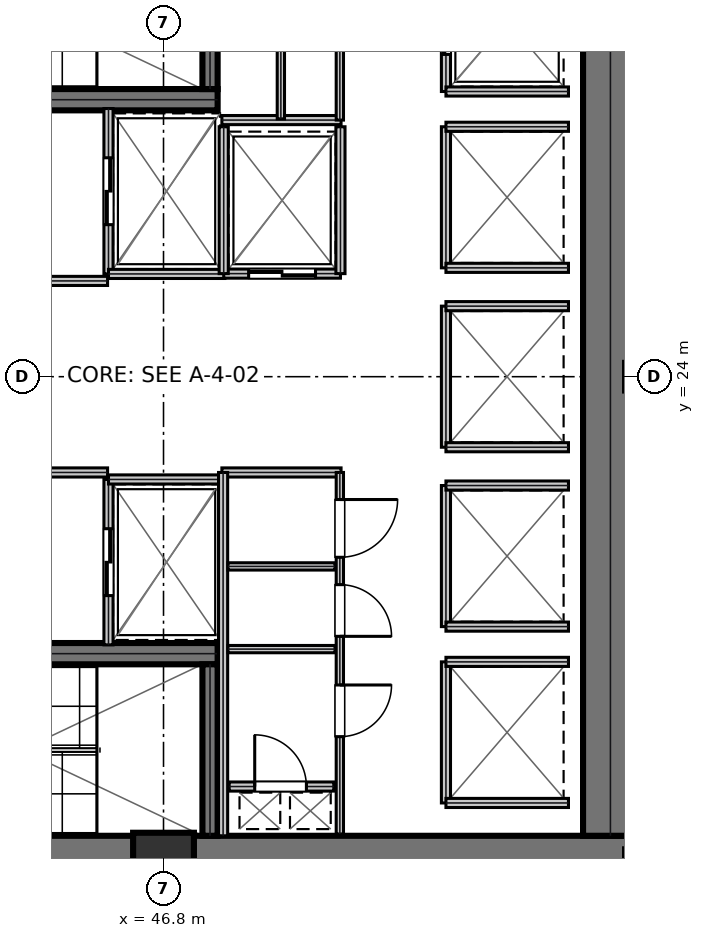
"""IFC4 building model, lengths in metres.
Left out: names, types, materials, properties, quantities, classifications, styles, units other than length and angle.
Written with IfcOpenShell. Run it as: python <this file> out.ifc"""

import sys

from ifc_helpers import new_model, si_unit, direction, frame, frame_2d, origin, origin_2d, place, context, subcontext, project, spatial, rectangle, extrude, element, fill, save


model = new_model("IFC4")
c1 = context("Model", 3, precision=1e-05, world=origin(), true_north=direction((0.0, 1.0)))
c2 = subcontext(c1, "Body", "Model", "MODEL_VIEW")
j1 = project(units=[si_unit("LENGTHUNIT", "METRE"), si_unit("PLANEANGLEUNIT", "RADIAN")], contexts=[c1])
p1 = place(None, origin())
s1 = spatial("IfcSite", under=j1, at=p1, CompositionType="ELEMENT")
p2 = place(p1, origin())
s2 = spatial("IfcBuilding", under=s1, at=p2, CompositionType="ELEMENT")
p3 = place(p2, frame((0.0, 0.0, 10.8)))
s3 = spatial("IfcBuildingStorey", under=s2, at=p3, CompositionType="ELEMENT", Elevation=10.8)
p4 = place(p3, frame((38.8, 16.0, 0.0), z_axis=(0.0, 0.0, 1.0), x_axis=(1.0, 0.0, 0.0)))
e1 = element("IfcWall", 1, at=p4, inside=s3, PredefinedType="SHEAR", context=c2, shape_type="SweptSolid", body=[
    extrude(rectangle(XDim=16.0, YDim=0.9, at=frame_2d((8.0, 0.0))), origin(), (0.0, 0.0, 1.0), 5.12),
])
p5 = place(p3, frame((54.15, 16.45, 0.0), z_axis=(0.0, 0.0, 1.0), x_axis=(0.0, 1.0, 0.0)))
e2 = element("IfcWall", 2, at=p5, inside=s3, PredefinedType="SHEAR", context=c2, shape_type="SweptSolid", body=[
    extrude(rectangle(XDim=15.1, YDim=0.9, at=frame_2d((7.55, 0.0))), origin(), (0.0, 0.0, 1.0), 5.12),
])
p6 = place(p3, frame((39.98, 28.555, 0.0), z_axis=(0.0, 0.0, 1.0), x_axis=(1.0, 0.0, 0.0)))
e3 = element("IfcWall", 3, at=p6, inside=s3, PredefinedType="SHEAR", context=c2, shape_type="SweptSolid", body=[
    extrude(rectangle(XDim=7.71, YDim=0.35, at=frame_2d((3.855, 0.0))), origin(), (0.0, 0.0, 1.0), 5.12),
])
p7 = place(p6, frame((0.25, 0.0, 0.0)))
e4 = element("IfcOpeningElement", 4, at=p7, cuts=e3, PredefinedType="OPENING", context=c2, shape_type="SweptSolid", body=[
    extrude(rectangle(XDim=1.1, YDim=2.15, at=frame_2d((0.55, 1.075))), frame((0.0, 0.185, 0.0), z_axis=(0.0, -1.0, 0.0), x_axis=(1.0, 0.0, 0.0)), (0.0, 0.0, 1.0), 0.37),
])
p8 = place(p3, frame((39.98, 19.445, 0.0), z_axis=(0.0, 0.0, 1.0), x_axis=(1.0, 0.0, 0.0)))
e5 = element("IfcWall", 5, at=p8, inside=s3, PredefinedType="SHEAR", context=c2, shape_type="SweptSolid", body=[
    extrude(rectangle(XDim=7.71, YDim=0.35, at=frame_2d((3.855, 0.0))), origin(), (0.0, 0.0, 1.0), 5.12),
])
p9 = place(p8, frame((0.25, 0.0, 0.0)))
e6 = element("IfcOpeningElement", 6, at=p9, cuts=e5, PredefinedType="OPENING", context=c2, shape_type="SweptSolid", body=[
    extrude(rectangle(XDim=1.1, YDim=2.15, at=frame_2d((0.55, 1.075))), frame((0.0, 0.185, 0.0), z_axis=(0.0, -1.0, 0.0), x_axis=(1.0, 0.0, 0.0)), (0.0, 0.0, 1.0), 0.37),
])
for number, where, z_axis, x_axis in (
    (7, (47.565, 28.73, 0.0), (0.0, 0.0, 1.0), (0.0, 1.0, 0.0)),
    (8, (47.565, 16.45, 0.0), (0.0, 0.0, 1.0), (0.0, 1.0, 0.0)),
):
    element("IfcWall", number, at=place(p3, frame(where, z_axis=z_axis, x_axis=x_axis)), inside=s3, PredefinedType="SHEAR", context=c2, shape_type="SweptSolid", body=[
        extrude(rectangle(XDim=2.82, YDim=0.25, at=frame_2d((1.41, 0.0))), origin(), (0.0, 0.0, 1.0), 5.12),
    ])
p10 = place(p3, frame((46.8, 16.0, 0.0), z_axis=(0.0, 0.0, 1.0), x_axis=(1.0, 0.0, 0.0)))
e9 = element("IfcColumn", 9, at=p10, inside=s3, PredefinedType="COLUMN", context=c2, shape_type="SweptSolid", body=[
    extrude(rectangle(XDim=1.0, YDim=1.0, at=origin_2d()), origin(), (0.0, 0.0, 1.0), 5.395),
])
p11 = place(p3, frame((39.98, 25.575, 0.0), z_axis=(0.0, 0.0, 1.0), x_axis=(1.0, 0.0, 0.0)))
e10 = element("IfcWall", 10, at=p11, inside=s3, PredefinedType="PARTITIONING", context=c2, shape_type="SweptSolid", body=[
    extrude(rectangle(XDim=5.9, YDim=0.15, at=frame_2d((2.95, 0.0))), origin(), (0.0, 0.0, 1.0), 5.12),
])
p12 = place(p11, frame((2.35, 0.0, 0.0)))
e11 = element("IfcOpeningElement", 11, at=p12, cuts=e10, PredefinedType="OPENING", context=c2, shape_type="SweptSolid", body=[
    extrude(rectangle(XDim=1.05, YDim=2.15, at=frame_2d((0.525, 1.075))), frame((0.0, 0.085, 0.0), z_axis=(0.0, -1.0, 0.0), x_axis=(1.0, 0.0, 0.0)), (0.0, 0.0, 1.0), 0.17),
])
p13 = place(p3, frame((39.98, 22.425, 0.0), z_axis=(0.0, 0.0, 1.0), x_axis=(1.0, 0.0, 0.0)))
e12 = element("IfcWall", 12, at=p13, inside=s3, PredefinedType="PARTITIONING", context=c2, shape_type="SweptSolid", body=[
    extrude(rectangle(XDim=5.9, YDim=0.15, at=frame_2d((2.95, 0.0))), origin(), (0.0, 0.0, 1.0), 5.12),
])
p14 = place(p13, frame((2.35, 0.0, 0.0)))
e13 = element("IfcOpeningElement", 13, at=p14, cuts=e12, PredefinedType="OPENING", context=c2, shape_type="SweptSolid", body=[
    extrude(rectangle(XDim=1.05, YDim=2.15, at=frame_2d((0.525, 1.075))), frame((0.0, 0.085, 0.0), z_axis=(0.0, -1.0, 0.0), x_axis=(1.0, 0.0, 0.0)), (0.0, 0.0, 1.0), 0.17),
])
p15 = place(p3, frame((45.895, 25.69, 0.0), z_axis=(0.0, 0.0, 1.0), x_axis=(0.0, 1.0, 0.0)))
e14 = element("IfcWall", 14, at=p15, inside=s3, PredefinedType="PARTITIONING", context=c2, shape_type="SweptSolid", body=[
    extrude(rectangle(XDim=2.72, YDim=0.15, at=frame_2d((1.36, 0.0))), origin(), (0.0, 0.0, 1.0), 5.12),
])
p16 = place(p15, frame((0.81, 0.0, 0.0)))
e15 = element("IfcOpeningElement", 15, at=p16, cuts=e14, PredefinedType="OPENING", context=c2, shape_type="SweptSolid", body=[
    extrude(rectangle(XDim=1.1, YDim=2.15, at=frame_2d((0.55, 1.075))), frame((0.0, 0.085, 0.0), z_axis=(0.0, -1.0, 0.0), x_axis=(1.0, 0.0, 0.0)), (0.0, 0.0, 1.0), 0.17),
])
p17 = place(p3, frame((45.895, 25.69, 0.0), z_axis=(0.0, 0.0, 1.0), x_axis=(1.0, 0.0, 0.0)))
e16 = element("IfcWall", 16, at=p17, inside=s3, PredefinedType="PARTITIONING", context=c2, shape_type="SweptSolid", body=[
    extrude(rectangle(XDim=1.915, YDim=0.15, at=frame_2d((0.958, 0.0))), origin(), (0.0, 0.0, 1.0), 5.12),
])
p18 = place(p3, frame((45.895, 19.59, 0.0), z_axis=(0.0, 0.0, 1.0), x_axis=(0.0, 1.0, 0.0)))
e17 = element("IfcWall", 17, at=p18, inside=s3, PredefinedType="PARTITIONING", context=c2, shape_type="SweptSolid", body=[
    extrude(rectangle(XDim=2.72, YDim=0.15, at=frame_2d((1.36, 0.0))), origin(), (0.0, 0.0, 1.0), 5.12),
])
p19 = place(p18, frame((0.81, 0.0, 0.0)))
e18 = element("IfcOpeningElement", 18, at=p19, cuts=e17, PredefinedType="OPENING", context=c2, shape_type="SweptSolid", body=[
    extrude(rectangle(XDim=1.1, YDim=2.15, at=frame_2d((0.55, 1.075))), frame((0.0, 0.085, 0.0), z_axis=(0.0, -1.0, 0.0), x_axis=(1.0, 0.0, 0.0)), (0.0, 0.0, 1.0), 0.17),
])
p20 = place(p3, frame((45.895, 22.31, 0.0), z_axis=(0.0, 0.0, 1.0), x_axis=(1.0, 0.0, 0.0)))
e19 = element("IfcWall", 19, at=p20, inside=s3, PredefinedType="PARTITIONING", context=c2, shape_type="SweptSolid", body=[
    extrude(rectangle(XDim=1.915, YDim=0.15, at=frame_2d((0.958, 0.0))), origin(), (0.0, 0.0, 1.0), 5.12),
])
p21 = place(p3, frame((47.79, 25.695, 0.0), z_axis=(0.0, 0.0, 1.0), x_axis=(1.0, 0.0, 0.0)))
e20 = element("IfcWall", 20, at=p21, inside=s3, PredefinedType="PARTITIONING", context=c2, shape_type="SweptSolid", body=[
    extrude(rectangle(XDim=1.92, YDim=0.15, at=frame_2d((0.96, 0.0))), origin(), (0.0, 0.0, 1.0), 5.12),
])
p22 = place(p21, frame((0.41, 0.0, 0.0)))
e21 = element("IfcOpeningElement", 21, at=p22, cuts=e20, PredefinedType="OPENING", context=c2, shape_type="SweptSolid", body=[
    extrude(rectangle(XDim=1.1, YDim=2.15, at=frame_2d((0.55, 1.075))), frame((0.0, 0.085, 0.0), z_axis=(0.0, -1.0, 0.0), x_axis=(1.0, 0.0, 0.0)), (0.0, 0.0, 1.0), 0.17),
])
for number, where, z_axis, x_axis in (
    (22, (47.79, 25.695, 0.0), (0.0, 0.0, 1.0), (0.0, 1.0, 0.0)),
    (23, (49.71, 25.695, 0.0), (0.0, 0.0, 1.0), (0.0, 1.0, 0.0)),
):
    element("IfcWall", number, at=place(p3, frame(where, z_axis=z_axis, x_axis=x_axis)), inside=s3, PredefinedType="PARTITIONING", context=c2, shape_type="SweptSolid", body=[
        extrude(rectangle(XDim=2.415, YDim=0.15, at=frame_2d((1.208, 0.0))), origin(), (0.0, 0.0, 1.0), 5.12),
    ])
p23 = place(p3, frame((51.445, 28.69, 0.0), z_axis=(0.0, 0.0, 1.0), x_axis=(0.0, 1.0, 0.0)))
e24 = element("IfcWall", 24, at=p23, inside=s3, PredefinedType="PARTITIONING", context=c2, shape_type="SweptSolid", body=[
    extrude(rectangle(XDim=2.32, YDim=0.15, at=frame_2d((1.16, 0.0))), origin(), (0.0, 0.0, 1.0), 5.12),
])
p24 = place(p23, frame((0.61, 0.0, 0.0)))
e25 = element("IfcOpeningElement", 25, at=p24, cuts=e24, PredefinedType="OPENING", context=c2, shape_type="SweptSolid", body=[
    extrude(rectangle(XDim=1.1, YDim=2.15, at=frame_2d((0.55, 1.075))), frame((0.0, 0.085, 0.0), z_axis=(0.0, -1.0, 0.0), x_axis=(1.0, 0.0, 0.0)), (0.0, 0.0, 1.0), 0.17),
])
p25 = place(p3, frame((51.445, 28.69, 0.0), z_axis=(0.0, 0.0, 1.0), x_axis=(1.0, 0.0, 0.0)))
e26 = element("IfcWall", 26, at=p25, inside=s3, PredefinedType="PARTITIONING", context=c2, shape_type="SweptSolid", body=[
    extrude(rectangle(XDim=2.015, YDim=0.15, at=frame_2d((1.007, 0.0))), origin(), (0.0, 0.0, 1.0), 5.12),
])
p26 = place(p3, frame((51.445, 25.79, 0.0), z_axis=(0.0, 0.0, 1.0), x_axis=(0.0, 1.0, 0.0)))
e27 = element("IfcWall", 27, at=p26, inside=s3, PredefinedType="PARTITIONING", context=c2, shape_type="SweptSolid", body=[
    extrude(rectangle(XDim=2.32, YDim=0.15, at=frame_2d((1.16, 0.0))), origin(), (0.0, 0.0, 1.0), 5.12),
])
for number, where, z_axis, x_axis in (
    (28, (51.445, 25.79, 0.0), (0.0, 0.0, 1.0), (1.0, 0.0, 0.0)),
    (29, (51.445, 28.11, 0.0), (0.0, 0.0, 1.0), (1.0, 0.0, 0.0)),
):
    element("IfcWall", number, at=place(p3, frame(where, z_axis=z_axis, x_axis=x_axis)), inside=s3, PredefinedType="PARTITIONING", context=c2, shape_type="SweptSolid", body=[
        extrude(rectangle(XDim=2.015, YDim=0.15, at=frame_2d((1.007, 0.0))), origin(), (0.0, 0.0, 1.0), 5.12),
    ])
p27 = place(p3, frame((51.445, 19.89, 0.0), z_axis=(0.0, 0.0, 1.0), x_axis=(0.0, 1.0, 0.0)))
e30 = element("IfcWall", 30, at=p27, inside=s3, PredefinedType="PARTITIONING", context=c2, shape_type="SweptSolid", body=[
    extrude(rectangle(XDim=2.32, YDim=0.15, at=frame_2d((1.16, 0.0))), origin(), (0.0, 0.0, 1.0), 5.12),
])
for number, where, z_axis, x_axis in (
    (31, (51.445, 19.89, 0.0), (0.0, 0.0, 1.0), (1.0, 0.0, 0.0)),
    (32, (51.445, 22.21, 0.0), (0.0, 0.0, 1.0), (1.0, 0.0, 0.0)),
):
    element("IfcWall", number, at=place(p3, frame(where, z_axis=z_axis, x_axis=x_axis)), inside=s3, PredefinedType="PARTITIONING", context=c2, shape_type="SweptSolid", body=[
        extrude(rectangle(XDim=2.015, YDim=0.15, at=frame_2d((1.007, 0.0))), origin(), (0.0, 0.0, 1.0), 5.12),
    ])
p28 = place(p3, frame((51.445, 22.84, 0.0), z_axis=(0.0, 0.0, 1.0), x_axis=(0.0, 1.0, 0.0)))
e33 = element("IfcWall", 33, at=p28, inside=s3, PredefinedType="PARTITIONING", context=c2, shape_type="SweptSolid", body=[
    extrude(rectangle(XDim=2.32, YDim=0.15, at=frame_2d((1.16, 0.0))), origin(), (0.0, 0.0, 1.0), 5.12),
])
for number, where, z_axis, x_axis in (
    (34, (51.445, 22.84, 0.0), (0.0, 0.0, 1.0), (1.0, 0.0, 0.0)),
    (35, (51.445, 25.16, 0.0), (0.0, 0.0, 1.0), (1.0, 0.0, 0.0)),
):
    element("IfcWall", number, at=place(p3, frame(where, z_axis=z_axis, x_axis=x_axis)), inside=s3, PredefinedType="PARTITIONING", context=c2, shape_type="SweptSolid", body=[
        extrude(rectangle(XDim=2.015, YDim=0.15, at=frame_2d((1.007, 0.0))), origin(), (0.0, 0.0, 1.0), 5.12),
    ])
p29 = place(p3, frame((51.445, 16.99, 0.0), z_axis=(0.0, 0.0, 1.0), x_axis=(0.0, 1.0, 0.0)))
e36 = element("IfcWall", 36, at=p29, inside=s3, PredefinedType="PARTITIONING", context=c2, shape_type="SweptSolid", body=[
    extrude(rectangle(XDim=2.32, YDim=0.15, at=frame_2d((1.16, 0.0))), origin(), (0.0, 0.0, 1.0), 5.12),
])
for number, where, z_axis, x_axis in (
    (37, (51.445, 16.99, 0.0), (0.0, 0.0, 1.0), (1.0, 0.0, 0.0)),
    (38, (51.445, 19.31, 0.0), (0.0, 0.0, 1.0), (1.0, 0.0, 0.0)),
):
    element("IfcWall", number, at=place(p3, frame(where, z_axis=z_axis, x_axis=x_axis)), inside=s3, PredefinedType="PARTITIONING", context=c2, shape_type="SweptSolid", body=[
        extrude(rectangle(XDim=2.015, YDim=0.15, at=frame_2d((1.007, 0.0))), origin(), (0.0, 0.0, 1.0), 5.12),
    ])
p30 = place(p3, frame((47.88, 17.26, 0.0), z_axis=(0.0, 0.0, 1.0), x_axis=(1.0, 0.0, 0.0)))
e39 = element("IfcWall", 39, at=p30, inside=s3, PredefinedType="PARTITIONING", context=c2, shape_type="SweptSolid", body=[
    extrude(rectangle(XDim=1.72, YDim=0.15, at=frame_2d((0.86, 0.0))), origin(), (0.0, 0.0, 1.0), 5.12),
])
p31 = place(p30, frame((0.42, 0.0, 0.0)))
e40 = element("IfcOpeningElement", 40, at=p31, cuts=e39, PredefinedType="OPENING", context=c2, shape_type="SweptSolid", body=[
    extrude(rectangle(XDim=0.85, YDim=2.15, at=frame_2d((0.425, 1.075))), frame((0.0, 0.085, 0.0), z_axis=(0.0, -1.0, 0.0), x_axis=(1.0, 0.0, 0.0)), (0.0, 0.0, 1.0), 0.17),
])
p32 = place(p3, frame((47.76, 22.425, 0.0), z_axis=(0.0, 0.0, 1.0), x_axis=(1.0, 0.0, 0.0)))
e41 = element("IfcWall", 41, at=p32, inside=s3, PredefinedType="PARTITIONING", context=c2, shape_type="SweptSolid", body=[
    extrude(rectangle(XDim=1.96, YDim=0.15, at=frame_2d((0.98, 0.0))), origin(), (0.0, 0.0, 1.0), 5.12),
])
p33 = place(p3, frame((47.78, 16.45, 0.0), z_axis=(0.0, 0.0, 1.0), x_axis=(0.0, 1.0, 0.0)))
e42 = element("IfcWall", 42, at=p33, inside=s3, PredefinedType="PARTITIONING", context=c2, shape_type="SweptSolid", body=[
    extrude(rectangle(XDim=5.975, YDim=0.15, at=frame_2d((2.988, 0.0))), origin(), (0.0, 0.0, 1.0), 5.12),
])
for number, where, z_axis, x_axis in (
    (43, (47.86, 19.52, 0.0), (0.0, 0.0, 1.0), (1.0, 0.0, 0.0)),
    (44, (47.86, 20.88, 0.0), (0.0, 0.0, 1.0), (1.0, 0.0, 0.0)),
):
    element("IfcWall", number, at=place(p3, frame(where, z_axis=z_axis, x_axis=x_axis)), inside=s3, PredefinedType="PARTITIONING", context=c2, shape_type="SweptSolid", body=[
        extrude(rectangle(XDim=1.76, YDim=0.12, at=frame_2d((0.88, 0.0))), origin(), (0.0, 0.0, 1.0), 5.12),
    ])
p34 = place(p3, frame((49.7, 16.48, 0.0), z_axis=(0.0, 0.0, 1.0), x_axis=(0.0, 1.0, 0.0)))
e45 = element("IfcWall", 45, at=p34, inside=s3, PredefinedType="PARTITIONING", context=c2, shape_type="SweptSolid", body=[
    extrude(rectangle(XDim=5.945, YDim=0.12, at=frame_2d((2.973, 0.0))), origin(), (0.0, 0.0, 1.0), 5.12),
])
p35 = place(p34, frame((1.6, 0.0, 0.0)))
e46 = element("IfcOpeningElement", 46, at=p35, cuts=e45, PredefinedType="OPENING", context=c2, shape_type="SweptSolid", body=[
    extrude(rectangle(XDim=0.85, YDim=2.15, at=frame_2d((0.425, 1.075))), frame((0.0, 0.07, 0.0), z_axis=(0.0, -1.0, 0.0), x_axis=(1.0, 0.0, 0.0)), (0.0, 0.0, 1.0), 0.14),
])
p36 = place(p34, frame((3.25, 0.0, 0.0)))
e47 = element("IfcOpeningElement", 47, at=p36, cuts=e45, PredefinedType="OPENING", context=c2, shape_type="SweptSolid", body=[
    extrude(rectangle(XDim=0.85, YDim=2.15, at=frame_2d((0.425, 1.075))), frame((0.0, 0.07, 0.0), z_axis=(0.0, -1.0, 0.0), x_axis=(1.0, 0.0, 0.0)), (0.0, 0.0, 1.0), 0.14),
])
p37 = place(p34, frame((4.55, 0.0, 0.0)))
e48 = element("IfcOpeningElement", 48, at=p37, cuts=e45, PredefinedType="OPENING", context=c2, shape_type="SweptSolid", body=[
    extrude(rectangle(XDim=0.95, YDim=2.15, at=frame_2d((0.475, 1.075))), frame((0.0, 0.07, 0.0), z_axis=(0.0, -1.0, 0.0), x_axis=(1.0, 0.0, 0.0)), (0.0, 0.0, 1.0), 0.14),
])
p38 = place(p3, frame((47.76, 28.22, 0.0), z_axis=(0.0, 0.0, 1.0), x_axis=(1.0, 0.0, 0.0)))
e49 = element("IfcWall", 49, at=p38, inside=s3, PredefinedType="PARTITIONING", context=c2, shape_type="SweptSolid", body=[
    extrude(rectangle(XDim=1.96, YDim=0.15, at=frame_2d((0.98, 0.0))), origin(), (0.0, 0.0, 1.0), 5.12),
])
p39 = place(p3, frame((48.73, 28.24, 0.0), z_axis=(0.0, 0.0, 1.0), x_axis=(0.0, 1.0, 0.0)))
e50 = element("IfcWall", 50, at=p39, inside=s3, PredefinedType="PARTITIONING", context=c2, shape_type="SweptSolid", body=[
    extrude(rectangle(XDim=3.28, YDim=0.12, at=frame_2d((1.64, 0.0))), origin(), (0.0, 0.0, 1.0), 5.12),
])
p40 = place(p39, frame((1.15, 0.0, 0.0)))
e51 = element("IfcOpeningElement", 51, at=p40, cuts=e50, PredefinedType="OPENING", context=c2, shape_type="SweptSolid", body=[
    extrude(rectangle(XDim=0.85, YDim=2.15, at=frame_2d((0.425, 1.075))), frame((0.0, 0.07, 0.0), z_axis=(0.0, -1.0, 0.0), x_axis=(1.0, 0.0, 0.0)), (0.0, 0.0, 1.0), 0.14),
])
p41 = place(p3, frame((49.7, 28.22, 0.0), z_axis=(0.0, 0.0, 1.0), x_axis=(0.0, 1.0, 0.0)))
e52 = element("IfcWall", 52, at=p41, inside=s3, PredefinedType="PARTITIONING", context=c2, shape_type="SweptSolid", body=[
    extrude(rectangle(XDim=3.3, YDim=0.12, at=frame_2d((1.65, 0.0))), origin(), (0.0, 0.0, 1.0), 5.12),
])
p42 = place(p41, frame((1.15, 0.0, 0.0)))
e53 = element("IfcOpeningElement", 53, at=p42, cuts=e52, PredefinedType="OPENING", context=c2, shape_type="SweptSolid", body=[
    extrude(rectangle(XDim=0.85, YDim=2.15, at=frame_2d((0.425, 1.075))), frame((0.0, 0.07, 0.0), z_axis=(0.0, -1.0, 0.0), x_axis=(1.0, 0.0, 0.0)), (0.0, 0.0, 1.0), 0.14),
])
p43 = place(p16, frame((1.1, 0.0, 0.0), z_axis=(0.0, 0.0, 1.0), x_axis=(-1.0, 0.0, 0.0)))
e54 = element("IfcDoor", 54, at=p43, inside=s3, OperationType="DOUBLE_DOOR_SLIDING", PredefinedType="DOOR", context=c2, shape_type="SweptSolid", body=[
    extrude(rectangle(XDim=1.1, YDim=2.15, at=frame_2d((0.55, 1.075))), frame((0.0, 0.025, 0.0), z_axis=(0.0, -1.0, 0.0), x_axis=(1.0, 0.0, 0.0)), (0.0, 0.0, 1.0), 0.05),
])
fill(e15, e54)
p44 = place(p19, frame((1.1, 0.0, 0.0), z_axis=(0.0, 0.0, 1.0), x_axis=(-1.0, 0.0, 0.0)))
e55 = element("IfcDoor", 55, at=p44, inside=s3, OperationType="DOUBLE_DOOR_SLIDING", PredefinedType="DOOR", context=c2, shape_type="SweptSolid", body=[
    extrude(rectangle(XDim=1.1, YDim=2.15, at=frame_2d((0.55, 1.075))), frame((0.0, 0.025, 0.0), z_axis=(0.0, -1.0, 0.0), x_axis=(1.0, 0.0, 0.0)), (0.0, 0.0, 1.0), 0.05),
])
fill(e18, e55)
p45 = place(p22, frame((1.1, 0.0, 0.0), z_axis=(0.0, 0.0, 1.0), x_axis=(-1.0, 0.0, 0.0)))
e56 = element("IfcDoor", 56, at=p45, inside=s3, OperationType="DOUBLE_DOOR_SLIDING", PredefinedType="DOOR", context=c2, shape_type="SweptSolid", body=[
    extrude(rectangle(XDim=1.1, YDim=2.15, at=frame_2d((0.55, 1.075))), frame((0.0, 0.025, 0.0), z_axis=(0.0, -1.0, 0.0), x_axis=(1.0, 0.0, 0.0)), (0.0, 0.0, 1.0), 0.05),
])
fill(e21, e56)
p46 = place(p24, frame((1.1, 0.0, 0.0), z_axis=(0.0, 0.0, 1.0), x_axis=(-1.0, 0.0, 0.0)))
e57 = element("IfcDoor", 57, at=p46, inside=s3, OperationType="DOUBLE_DOOR_SLIDING", PredefinedType="DOOR", context=c2, shape_type="SweptSolid", body=[
    extrude(rectangle(XDim=1.1, YDim=2.15, at=frame_2d((0.55, 1.075))), frame((0.0, 0.025, 0.0), z_axis=(0.0, -1.0, 0.0), x_axis=(1.0, 0.0, 0.0)), (0.0, 0.0, 1.0), 0.05),
])
fill(e25, e57)
p47 = place(p31, origin())
e58 = element("IfcDoor", 58, at=p47, inside=s3, OperationType="SINGLE_SWING_LEFT", PredefinedType="TRAPDOOR", context=c2, shape_type="SweptSolid", body=[
    extrude(rectangle(XDim=0.85, YDim=2.15, at=frame_2d((0.425, 1.075))), frame((0.0, 0.025, 0.0), z_axis=(0.0, -1.0, 0.0), x_axis=(1.0, 0.0, 0.0)), (0.0, 0.0, 1.0), 0.05),
])
fill(e40, e58)
p48 = place(p35, frame((0.85, 0.0, 0.0), z_axis=(0.0, 0.0, 1.0), x_axis=(-1.0, 0.0, 0.0)))
e59 = element("IfcDoor", 59, at=p48, inside=s3, OperationType="SINGLE_SWING_LEFT", PredefinedType="DOOR", context=c2, shape_type="SweptSolid", body=[
    extrude(rectangle(XDim=0.85, YDim=2.15, at=frame_2d((0.425, 1.075))), frame((0.0, 0.025, 0.0), z_axis=(0.0, -1.0, 0.0), x_axis=(1.0, 0.0, 0.0)), (0.0, 0.0, 1.0), 0.05),
])
fill(e46, e59)
p49 = place(p36, frame((0.85, 0.0, 0.0), z_axis=(0.0, 0.0, 1.0), x_axis=(-1.0, 0.0, 0.0)))
e60 = element("IfcDoor", 60, at=p49, inside=s3, OperationType="SINGLE_SWING_RIGHT", PredefinedType="DOOR", context=c2, shape_type="SweptSolid", body=[
    extrude(rectangle(XDim=0.85, YDim=2.15, at=frame_2d((0.425, 1.075))), frame((0.0, 0.025, 0.0), z_axis=(0.0, -1.0, 0.0), x_axis=(1.0, 0.0, 0.0)), (0.0, 0.0, 1.0), 0.05),
])
fill(e47, e60)
p50 = place(p37, frame((0.95, 0.0, 0.0), z_axis=(0.0, 0.0, 1.0), x_axis=(-1.0, 0.0, 0.0)))
e61 = element("IfcDoor", 61, at=p50, inside=s3, OperationType="SINGLE_SWING_LEFT", PredefinedType="DOOR", context=c2, shape_type="SweptSolid", body=[
    extrude(rectangle(XDim=0.95, YDim=2.15, at=frame_2d((0.475, 1.075))), frame((0.0, 0.025, 0.0), z_axis=(0.0, -1.0, 0.0), x_axis=(1.0, 0.0, 0.0)), (0.0, 0.0, 1.0), 0.05),
])
fill(e48, e61)
save(model, sys.argv[1])
